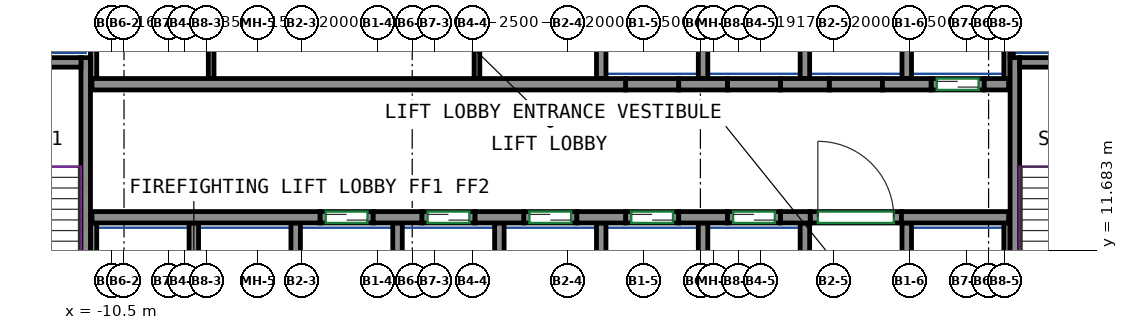
"""IFC4 building model, lengths in metres.
Left out: names, types, materials, properties, quantities, classifications, styles, units other than length and angle.
Written with IfcOpenShell. Run it as: python <this file> out.ifc"""

import sys

from ifc_helpers import new_model, si_unit, direction, frame, frame_2d, origin, place, context, subcontext, project, spatial, rectangle, extrude, source, transform, mapped, element, fill, save


model = new_model("IFC4")
c1 = context("Model", 3, precision=1e-05, world=origin(), true_north=direction((0.0, 1.0)))
c2 = subcontext(c1, "Body", "Model", "MODEL_VIEW")
j1 = project(units=[si_unit("LENGTHUNIT", "METRE"), si_unit("PLANEANGLEUNIT", "RADIAN")], contexts=[c1])
p1 = place(None, origin())
s1 = spatial("IfcSite", under=j1, at=p1, CompositionType="ELEMENT")
p2 = place(p1, origin())
s2 = spatial("IfcBuilding", under=s1, at=p2, CompositionType="ELEMENT")
p3 = place(p2, frame((0.0, 0.0, 195.7)))
s3 = spatial("IfcBuildingStorey", under=s2, at=p3, CompositionType="ELEMENT", Elevation=195.7)
m1 = source(origin(), c2, "Body", "SweptSolid", [
    extrude(rectangle(XDim=7.75, YDim=0.25, at=frame_2d((3.875, 0.0))), origin(), (0.0, 0.0, 1.0), 3.8),
])
p4 = place(p3, frame((-11.175, 9.0, 0.0), z_axis=(0.0, 0.0, 1.0), x_axis=(0.0, 1.0, 0.0)))
e1 = element("IfcWall", 1, at=p4, inside=s3, PredefinedType="SHEAR", context=c2, shape_type="MappedRepresentation", body=[
    mapped(m1, transform((0.0, 0.0, 0.0))),
])
m2 = source(origin(), c2, "Body", "SweptSolid", [
    extrude(rectangle(XDim=3.7, YDim=0.25, at=frame_2d((1.85, 0.0))), origin(), (0.0, 0.0, 1.0), 3.8),
])
p5 = place(p3, frame((-15.0, 16.625, 0.0), z_axis=(0.0, 0.0, 1.0), x_axis=(1.0, 0.0, 0.0)))
e2 = element("IfcWall", 2, at=p5, inside=s3, PredefinedType="SHEAR", context=c2, shape_type="MappedRepresentation", body=[
    mapped(m2, transform((0.0, 0.0, 0.0))),
])
p6 = place(p3, frame((13.275, 9.0, 0.0), z_axis=(0.0, 0.0, 1.0), x_axis=(0.0, 1.0, 0.0)))
e3 = element("IfcWall", 3, at=p6, inside=s3, PredefinedType="SHEAR", context=c2, shape_type="MappedRepresentation", body=[
    mapped(m1, transform((0.0, 0.0, 0.0))),
])
m3 = source(origin(), c2, "Body", "SweptSolid", [
    extrude(rectangle(XDim=3.7, YDim=0.25, at=frame_2d((1.85, 0.0))), origin(), (0.0, 0.0, 1.0), 3.8),
])
p7 = place(p3, frame((13.4, 16.625, 0.0), z_axis=(0.0, 0.0, 1.0), x_axis=(1.0, 0.0, 0.0)))
e4 = element("IfcWall", 4, at=p7, inside=s3, PredefinedType="SHEAR", context=c2, shape_type="MappedRepresentation", body=[
    mapped(m3, transform((0.0, 0.0, 0.0))),
])
m4 = source(origin(), c2, "Body", "SweptSolid", [
    extrude(rectangle(XDim=6.0, YDim=0.3, at=frame_2d((3.0, 0.0))), origin(), (0.0, 0.0, 1.0), 3.8),
])
p8 = place(p3, frame((-11.01, 12.55, 0.0), z_axis=(0.0, 0.0, 1.0), x_axis=(1.0, 0.0, 0.0)))
e5 = element("IfcWall", 5, at=p8, inside=s3, PredefinedType="SHEAR", context=c2, shape_type="MappedRepresentation", body=[
    mapped(m4, transform((0.0, 0.0, 0.0))),
])
m5 = source(origin(), c2, "Body", "SweptSolid", [
    extrude(rectangle(XDim=1.28, YDim=0.3, at=frame_2d((0.64, 0.0))), origin(), (0.0, 0.0, 1.0), 3.8),
])
for number, where, z_axis, x_axis in (
    (6, (-3.61, 12.55, 0.0), (0.0, 0.0, 1.0), (1.0, 0.0, 0.0)),
    (7, (-0.93, 12.55, 0.0), (0.0, 0.0, 1.0), (1.0, 0.0, 0.0)),
    (8, (1.75, 12.55, 0.0), (0.0, 0.0, 1.0), (1.0, 0.0, 0.0)),
    (9, (4.43, 12.55, 0.0), (0.0, 0.0, 1.0), (1.0, 0.0, 0.0)),
):
    element("IfcWall", number, at=place(p3, frame(where, z_axis=z_axis, x_axis=x_axis)), inside=s3, PredefinedType="SHEAR", context=c2, shape_type="MappedRepresentation", body=[
        mapped(m5, transform((0.0, 0.0, 0.0))),
    ])
m6 = source(origin(), c2, "Body", "SweptSolid", [
    extrude(rectangle(XDim=0.78, YDim=0.3, at=frame_2d((0.39, 0.0))), origin(), (0.0, 0.0, 1.0), 3.8),
])
p9 = place(p3, frame((7.11, 12.55, 0.0), z_axis=(0.0, 0.0, 1.0), x_axis=(1.0, 0.0, 0.0)))
e10 = element("IfcWall", 10, at=p9, inside=s3, PredefinedType="SHEAR", context=c2, shape_type="MappedRepresentation", body=[
    mapped(m6, transform((0.0, 0.0, 0.0))),
])
m7 = source(origin(), c2, "Body", "SweptSolid", [
    extrude(rectangle(XDim=2.82, YDim=0.3, at=frame_2d((1.41, 0.0))), origin(), (0.0, 0.0, 1.0), 3.8),
])
p10 = place(p3, frame((10.29, 12.55, 0.0), z_axis=(0.0, 0.0, 1.0), x_axis=(1.0, 0.0, 0.0)))
e11 = element("IfcWall", 11, at=p10, inside=s3, PredefinedType="SHEAR", context=c2, shape_type="MappedRepresentation", body=[
    mapped(m7, transform((0.0, 0.0, 0.0))),
])
m8 = source(origin(), c2, "Body", "SweptSolid", [
    extrude(rectangle(XDim=14.04, YDim=0.3, at=frame_2d((7.02, 0.0))), origin(), (0.0, 0.0, 1.0), 3.8),
])
p11 = place(p3, frame((-11.01, 16.05, 0.0), z_axis=(0.0, 0.0, 1.0), x_axis=(1.0, 0.0, 0.0)))
e12 = element("IfcWall", 12, at=p11, inside=s3, PredefinedType="SHEAR", context=c2, shape_type="MappedRepresentation", body=[
    mapped(m8, transform((0.0, 0.0, 0.0))),
])
p12 = place(p3, frame((4.43, 16.05, 0.0), z_axis=(0.0, 0.0, 1.0), x_axis=(1.0, 0.0, 0.0)))
e13 = element("IfcWall", 13, at=p12, inside=s3, PredefinedType="SHEAR", context=c2, shape_type="MappedRepresentation", body=[
    mapped(m5, transform((0.0, 0.0, 0.0))),
])
m9 = source(origin(), c2, "Body", "SweptSolid", [
    extrude(rectangle(XDim=1.28, YDim=0.3, at=frame_2d((0.64, 0.0))), origin(), (0.0, 0.0, 1.0), 3.8),
])
p13 = place(p3, frame((7.11, 16.05, 0.0), z_axis=(0.0, 0.0, 1.0), x_axis=(1.0, 0.0, 0.0)))
e14 = element("IfcWall", 14, at=p13, inside=s3, PredefinedType="SHEAR", context=c2, shape_type="MappedRepresentation", body=[
    mapped(m9, transform((0.0, 0.0, 0.0))),
])
p14 = place(p3, frame((9.79, 16.05, 0.0), z_axis=(0.0, 0.0, 1.0), x_axis=(1.0, 0.0, 0.0)))
e15 = element("IfcWall", 15, at=p14, inside=s3, PredefinedType="SHEAR", context=c2, shape_type="MappedRepresentation", body=[
    mapped(m5, transform((0.0, 0.0, 0.0))),
])
m10 = source(origin(), c2, "Body", "SweptSolid", [
    extrude(rectangle(XDim=0.64, YDim=0.3, at=frame_2d((0.32, 0.0))), origin(), (0.0, 0.0, 1.0), 3.8),
])
p15 = place(p3, frame((12.47, 16.05, 0.0), z_axis=(0.0, 0.0, 1.0), x_axis=(1.0, 0.0, 0.0)))
e16 = element("IfcWall", 16, at=p15, inside=s3, PredefinedType="SHEAR", context=c2, shape_type="MappedRepresentation", body=[
    mapped(m10, transform((0.0, 0.0, 0.0))),
])
m11 = source(origin(), c2, "Body", "SweptSolid", [
    extrude(rectangle(XDim=1.4, YDim=0.3, at=frame_2d((0.7, 0.0))), origin(), (0.0, 0.0, 1.0), 3.8),
])
p16 = place(p3, frame((-5.01, 12.55, 0.0), z_axis=(0.0, 0.0, 1.0), x_axis=(1.0, 0.0, 0.0)))
e17 = element("IfcWall", 17, at=p16, inside=s3, PredefinedType="PARTITIONING", context=c2, shape_type="MappedRepresentation", body=[
    mapped(m11, transform((0.0, 0.0, 0.0))),
])
p17 = place(p16, frame((0.15, 0.0, 0.0)))
e18 = element("IfcOpeningElement", 18, at=p17, cuts=e17, PredefinedType="OPENING", context=c2, shape_type="SweptSolid", body=[
    extrude(rectangle(XDim=1.1, YDim=2.1, at=frame_2d((0.55, 1.05))), frame((0.0, 0.16, 0.0), z_axis=(0.0, -1.0, 0.0), x_axis=(1.0, 0.0, 0.0)), (0.0, 0.0, 1.0), 0.32),
])
m12 = source(origin(), c2, "Body", "SweptSolid", [
    extrude(rectangle(XDim=1.4, YDim=0.3, at=frame_2d((0.7, 0.0))), origin(), (0.0, 0.0, 1.0), 3.8),
])
p18 = place(p3, frame((-2.33, 12.55, 0.0), z_axis=(0.0, 0.0, 1.0), x_axis=(1.0, 0.0, 0.0)))
e19 = element("IfcWall", 19, at=p18, inside=s3, PredefinedType="PARTITIONING", context=c2, shape_type="MappedRepresentation", body=[
    mapped(m12, transform((0.0, 0.0, 0.0))),
])
p19 = place(p18, frame((0.15, 0.0, 0.0)))
e20 = element("IfcOpeningElement", 20, at=p19, cuts=e19, PredefinedType="OPENING", context=c2, shape_type="SweptSolid", body=[
    extrude(rectangle(XDim=1.1, YDim=2.1, at=frame_2d((0.55, 1.05))), frame((0.0, 0.16, 0.0), z_axis=(0.0, -1.0, 0.0), x_axis=(1.0, 0.0, 0.0)), (0.0, 0.0, 1.0), 0.32),
])
p20 = place(p3, frame((0.35, 12.55, 0.0), z_axis=(0.0, 0.0, 1.0), x_axis=(1.0, 0.0, 0.0)))
e21 = element("IfcWall", 21, at=p20, inside=s3, PredefinedType="PARTITIONING", context=c2, shape_type="MappedRepresentation", body=[
    mapped(m11, transform((0.0, 0.0, 0.0))),
])
p21 = place(p20, frame((0.15, 0.0, 0.0)))
e22 = element("IfcOpeningElement", 22, at=p21, cuts=e21, PredefinedType="OPENING", context=c2, shape_type="SweptSolid", body=[
    extrude(rectangle(XDim=1.1, YDim=2.1, at=frame_2d((0.55, 1.05))), frame((0.0, 0.16, 0.0), z_axis=(0.0, -1.0, 0.0), x_axis=(1.0, 0.0, 0.0)), (0.0, 0.0, 1.0), 0.32),
])
p22 = place(p3, frame((3.03, 12.55, 0.0), z_axis=(0.0, 0.0, 1.0), x_axis=(1.0, 0.0, 0.0)))
e23 = element("IfcWall", 23, at=p22, inside=s3, PredefinedType="PARTITIONING", context=c2, shape_type="MappedRepresentation", body=[
    mapped(m11, transform((0.0, 0.0, 0.0))),
])
p23 = place(p22, frame((0.15, 0.0, 0.0)))
e24 = element("IfcOpeningElement", 24, at=p23, cuts=e23, PredefinedType="OPENING", context=c2, shape_type="SweptSolid", body=[
    extrude(rectangle(XDim=1.1, YDim=2.1, at=frame_2d((0.55, 1.05))), frame((0.0, 0.16, 0.0), z_axis=(0.0, -1.0, 0.0), x_axis=(1.0, 0.0, 0.0)), (0.0, 0.0, 1.0), 0.32),
])
p24 = place(p3, frame((5.71, 12.55, 0.0), z_axis=(0.0, 0.0, 1.0), x_axis=(1.0, 0.0, 0.0)))
e25 = element("IfcWall", 25, at=p24, inside=s3, PredefinedType="PARTITIONING", context=c2, shape_type="MappedRepresentation", body=[
    mapped(m12, transform((0.0, 0.0, 0.0))),
])
p25 = place(p24, frame((0.15, 0.0, 0.0)))
e26 = element("IfcOpeningElement", 26, at=p25, cuts=e25, PredefinedType="OPENING", context=c2, shape_type="SweptSolid", body=[
    extrude(rectangle(XDim=1.1, YDim=2.1, at=frame_2d((0.55, 1.05))), frame((0.0, 0.16, 0.0), z_axis=(0.0, -1.0, 0.0), x_axis=(1.0, 0.0, 0.0)), (0.0, 0.0, 1.0), 0.32),
])
p26 = place(p3, frame((11.07, 16.05, 0.0), z_axis=(0.0, 0.0, 1.0), x_axis=(1.0, 0.0, 0.0)))
e27 = element("IfcWall", 27, at=p26, inside=s3, PredefinedType="PARTITIONING", context=c2, shape_type="MappedRepresentation", body=[
    mapped(m11, transform((0.0, 0.0, 0.0))),
])
p27 = place(p26, frame((0.15, 0.0, 0.0)))
e28 = element("IfcOpeningElement", 28, at=p27, cuts=e27, PredefinedType="OPENING", context=c2, shape_type="SweptSolid", body=[
    extrude(rectangle(XDim=1.1, YDim=2.1, at=frame_2d((0.55, 1.05))), frame((0.0, 0.16, 0.0), z_axis=(0.0, -1.0, 0.0), x_axis=(1.0, 0.0, 0.0)), (0.0, 0.0, 1.0), 0.32),
])
m13 = source(origin(), c2, "Body", "SweptSolid", [
    extrude(rectangle(XDim=2.4, YDim=0.3, at=frame_2d((1.2, 0.0))), origin(), (0.0, 0.0, 1.0), 3.8),
])
p28 = place(p3, frame((7.89, 12.55, 0.0), z_axis=(0.0, 0.0, 1.0), x_axis=(1.0, 0.0, 0.0)))
e29 = element("IfcWall", 29, at=p28, inside=s3, PredefinedType="PARTITIONING", context=c2, shape_type="MappedRepresentation", body=[
    mapped(m13, transform((0.0, 0.0, 0.0))),
])
p29 = place(p28, frame((0.2, 0.0, 0.0)))
e30 = element("IfcOpeningElement", 30, at=p29, cuts=e29, PredefinedType="OPENING", context=c2, shape_type="SweptSolid", body=[
    extrude(rectangle(XDim=2.0, YDim=2.1, at=frame_2d((1.0, 1.05))), frame((0.0, 0.16, 0.0), z_axis=(0.0, -1.0, 0.0), x_axis=(1.0, 0.0, 0.0)), (0.0, 0.0, 1.0), 0.32),
])
p30 = place(p3, frame((3.03, 16.05, 0.0), z_axis=(0.0, 0.0, 1.0), x_axis=(1.0, 0.0, 0.0)))
e31 = element("IfcWall", 31, at=p30, inside=s3, PredefinedType="PARTITIONING", context=c2, shape_type="MappedRepresentation", body=[
    mapped(m11, transform((0.0, 0.0, 0.0))),
])
for number, where, z_axis, x_axis in (
    (32, (5.71, 16.05, 0.0), (0.0, 0.0, 1.0), (1.0, 0.0, 0.0)),
    (33, (8.39, 16.05, 0.0), (0.0, 0.0, 1.0), (1.0, 0.0, 0.0)),
):
    element("IfcWall", number, at=place(p3, frame(where, z_axis=z_axis, x_axis=x_axis)), inside=s3, PredefinedType="PARTITIONING", context=c2, shape_type="MappedRepresentation", body=[
        mapped(m12, transform((0.0, 0.0, 0.0))),
    ])
m14 = source(origin(), c2, "Body", "SweptSolid", [
    extrude(rectangle(XDim=3.275, YDim=0.165, at=frame_2d((1.638, 0.0))), origin(), (0.0, 0.0, 1.0), 3.8),
])
p31 = place(p3, frame((13.067, 16.2, 0.0), z_axis=(0.0, 0.0, 1.0), x_axis=(0.0, 1.0, 0.0)))
e34 = element("IfcWall", 34, at=p31, inside=s3, PredefinedType="PARTITIONING", context=c2, shape_type="MappedRepresentation", body=[
    mapped(m14, transform((0.0, 0.0, 0.0))),
])
m15 = source(origin(), c2, "Body", "SweptSolid", [
    extrude(rectangle(XDim=4.8, YDim=0.165, at=frame_2d((2.4, 0.0))), origin(), (0.0, 0.0, 1.0), 3.8),
])
p32 = place(p3, frame((-10.968, 16.2, 0.0), z_axis=(0.0, 0.0, 1.0), x_axis=(0.0, 1.0, 0.0)))
e35 = element("IfcWall", 35, at=p32, inside=s3, PredefinedType="PARTITIONING", context=c2, shape_type="MappedRepresentation", body=[
    mapped(m15, transform((0.0, 0.0, 0.0))),
])
m16 = source(origin(), c2, "Body", "SweptSolid", [
    extrude(rectangle(XDim=3.275, YDim=0.25, at=frame_2d((1.638, 0.0))), origin(), (0.0, 0.0, 1.0), 3.8),
])
p33 = place(p3, frame((10.43, 16.2, 0.0), z_axis=(0.0, 0.0, 1.0), x_axis=(0.0, 1.0, 0.0)))
e36 = element("IfcWall", 36, at=p33, inside=s3, PredefinedType="PARTITIONING", context=c2, shape_type="MappedRepresentation", body=[
    mapped(m16, transform((0.0, 0.0, 0.0))),
])
m17 = source(origin(), c2, "Body", "SweptSolid", [
    extrude(rectangle(XDim=2.725, YDim=0.085, at=frame_2d((1.363, 0.0))), origin(), (0.0, 0.0, 1.0), 3.8),
])
p34 = place(p3, frame((13.192, 16.75, 0.0), z_axis=(0.0, 0.0, 1.0), x_axis=(0.0, 1.0, 0.0)))
e37 = element("IfcWall", 37, at=p34, inside=s3, PredefinedType="PARTITIONING", context=c2, shape_type="MappedRepresentation", body=[
    mapped(m17, transform((0.0, 0.0, 0.0))),
])
for number, where, z_axis, x_axis in (
    (38, (2.39, 16.2, 0.0), (0.0, 0.0, 1.0), (0.0, 1.0, 0.0)),
    (39, (5.07, 16.2, 0.0), (0.0, 0.0, 1.0), (0.0, 1.0, 0.0)),
    (40, (7.75, 16.2, 0.0), (0.0, 0.0, 1.0), (0.0, 1.0, 0.0)),
):
    element("IfcWall", number, at=place(p3, frame(where, z_axis=z_axis, x_axis=x_axis)), inside=s3, PredefinedType="PARTITIONING", context=c2, shape_type="MappedRepresentation", body=[
        mapped(m16, transform((0.0, 0.0, 0.0))),
    ])
m18 = source(origin(), c2, "Body", "SweptSolid", [
    extrude(rectangle(XDim=3.4, YDim=0.25, at=frame_2d((1.7, 0.0))), origin(), (0.0, 0.0, 1.0), 3.8),
])
p35 = place(p3, frame((10.43, 9.0, 0.0), z_axis=(0.0, 0.0, 1.0), x_axis=(0.0, 1.0, 0.0)))
e41 = element("IfcWall", 41, at=p35, inside=s3, PredefinedType="PARTITIONING", context=c2, shape_type="MappedRepresentation", body=[
    mapped(m18, transform((0.0, 0.0, 0.0))),
])
m19 = source(origin(), c2, "Body", "SweptSolid", [
    extrude(rectangle(XDim=3.4, YDim=0.165, at=frame_2d((1.7, 0.0))), origin(), (0.0, 0.0, 1.0), 3.8),
])
p36 = place(p3, frame((13.067, 9.0, 0.0), z_axis=(0.0, 0.0, 1.0), x_axis=(0.0, 1.0, 0.0)))
e42 = element("IfcWall", 42, at=p36, inside=s3, PredefinedType="PARTITIONING", context=c2, shape_type="MappedRepresentation", body=[
    mapped(m19, transform((0.0, 0.0, 0.0))),
])
for number, where, z_axis, x_axis in (
    (43, (2.39, 9.0, 0.0), (0.0, 0.0, 1.0), (0.0, 1.0, 0.0)),
    (44, (5.07, 9.0, 0.0), (0.0, 0.0, 1.0), (0.0, 1.0, 0.0)),
    (45, (7.75, 9.0, 0.0), (0.0, 0.0, 1.0), (0.0, 1.0, 0.0)),
    (46, (-0.29, 9.0, 0.0), (0.0, 0.0, 1.0), (0.0, 1.0, 0.0)),
):
    element("IfcWall", number, at=place(p3, frame(where, z_axis=z_axis, x_axis=x_axis)), inside=s3, PredefinedType="PARTITIONING", context=c2, shape_type="MappedRepresentation", body=[
        mapped(m18, transform((0.0, 0.0, 0.0))),
    ])
p37 = place(p3, frame((-10.968, 9.0, 0.0), z_axis=(0.0, 0.0, 1.0), x_axis=(0.0, 1.0, 0.0)))
e47 = element("IfcWall", 47, at=p37, inside=s3, PredefinedType="PARTITIONING", context=c2, shape_type="MappedRepresentation", body=[
    mapped(m19, transform((0.0, 0.0, 0.0))),
])
for number, where, z_axis, x_axis in (
    (48, (-2.97, 9.0, 0.0), (0.0, 0.0, 1.0), (0.0, 1.0, 0.0)),
    (49, (-5.65, 9.0, 0.0), (0.0, 0.0, 1.0), (0.0, 1.0, 0.0)),
    (50, (-8.33, 9.0, 0.0), (0.0, 0.0, 1.0), (0.0, 1.0, 0.0)),
):
    element("IfcWall", number, at=place(p3, frame(where, z_axis=z_axis, x_axis=x_axis)), inside=s3, PredefinedType="PARTITIONING", context=c2, shape_type="MappedRepresentation", body=[
        mapped(m18, transform((0.0, 0.0, 0.0))),
    ])
m20 = source(origin(), c2, "Body", "SweptSolid", [
    extrude(rectangle(XDim=4.8, YDim=0.15, at=frame_2d((2.4, 0.0))), origin(), (0.0, 0.0, 1.0), 3.8),
])
for number, where, z_axis, x_axis in (
    (51, (-7.875, 16.2, 0.0), (0.0, 0.0, 1.0), (0.0, 1.0, 0.0)),
    (52, (-0.88, 16.2, 0.0), (0.0, 0.0, 1.0), (0.0, 1.0, 0.0)),
):
    element("IfcWall", number, at=place(p3, frame(where, z_axis=z_axis, x_axis=x_axis)), inside=s3, PredefinedType="PARTITIONING", context=c2, shape_type="MappedRepresentation", body=[
        mapped(m20, transform((0.0, 0.0, 0.0))),
    ])
p38 = place(p29, origin())
e53 = element("IfcDoor", 53, at=p38, inside=s3, OperationType="DOUBLE_DOOR_SINGLE_SWING", PredefinedType="DOOR", context=c2, shape_type="SweptSolid", body=[
    extrude(rectangle(XDim=2.0, YDim=2.1, at=frame_2d((1.0, 1.05))), frame((0.0, 0.025, 0.0), z_axis=(0.0, -1.0, 0.0), x_axis=(1.0, 0.0, 0.0)), (0.0, 0.0, 1.0), 0.05),
])
fill(e30, e53)
p39 = place(p17, origin())
e54 = element("IfcDoor", 54, at=p39, inside=s3, OperationType="DOUBLE_DOOR_SLIDING", PredefinedType="DOOR", context=c2, shape_type="SweptSolid", body=[
    extrude(rectangle(XDim=1.1, YDim=2.1, at=frame_2d((0.55, 1.05))), frame((0.0, 0.025, 0.0), z_axis=(0.0, -1.0, 0.0), x_axis=(1.0, 0.0, 0.0)), (0.0, 0.0, 1.0), 0.05),
])
fill(e18, e54)
p40 = place(p19, origin())
e55 = element("IfcDoor", 55, at=p40, inside=s3, OperationType="DOUBLE_DOOR_SLIDING", PredefinedType="DOOR", context=c2, shape_type="SweptSolid", body=[
    extrude(rectangle(XDim=1.1, YDim=2.1, at=frame_2d((0.55, 1.05))), frame((0.0, 0.025, 0.0), z_axis=(0.0, -1.0, 0.0), x_axis=(1.0, 0.0, 0.0)), (0.0, 0.0, 1.0), 0.05),
])
fill(e20, e55)
p41 = place(p21, origin())
e56 = element("IfcDoor", 56, at=p41, inside=s3, OperationType="DOUBLE_DOOR_SLIDING", PredefinedType="DOOR", context=c2, shape_type="SweptSolid", body=[
    extrude(rectangle(XDim=1.1, YDim=2.1, at=frame_2d((0.55, 1.05))), frame((0.0, 0.025, 0.0), z_axis=(0.0, -1.0, 0.0), x_axis=(1.0, 0.0, 0.0)), (0.0, 0.0, 1.0), 0.05),
])
fill(e22, e56)
p42 = place(p23, origin())
e57 = element("IfcDoor", 57, at=p42, inside=s3, OperationType="DOUBLE_DOOR_SLIDING", PredefinedType="DOOR", context=c2, shape_type="SweptSolid", body=[
    extrude(rectangle(XDim=1.1, YDim=2.1, at=frame_2d((0.55, 1.05))), frame((0.0, 0.025, 0.0), z_axis=(0.0, -1.0, 0.0), x_axis=(1.0, 0.0, 0.0)), (0.0, 0.0, 1.0), 0.05),
])
fill(e24, e57)
p43 = place(p25, origin())
e58 = element("IfcDoor", 58, at=p43, inside=s3, OperationType="DOUBLE_DOOR_SLIDING", PredefinedType="DOOR", context=c2, shape_type="SweptSolid", body=[
    extrude(rectangle(XDim=1.1, YDim=2.1, at=frame_2d((0.55, 1.05))), frame((0.0, 0.025, 0.0), z_axis=(0.0, -1.0, 0.0), x_axis=(1.0, 0.0, 0.0)), (0.0, 0.0, 1.0), 0.05),
])
fill(e26, e58)
p44 = place(p27, origin())
e59 = element("IfcDoor", 59, at=p44, inside=s3, OperationType="DOUBLE_DOOR_SLIDING", PredefinedType="DOOR", context=c2, shape_type="SweptSolid", body=[
    extrude(rectangle(XDim=1.1, YDim=2.1, at=frame_2d((0.55, 1.05))), frame((0.0, 0.025, 0.0), z_axis=(0.0, -1.0, 0.0), x_axis=(1.0, 0.0, 0.0)), (0.0, 0.0, 1.0), 0.05),
])
fill(e28, e59)
save(model, sys.argv[1])
